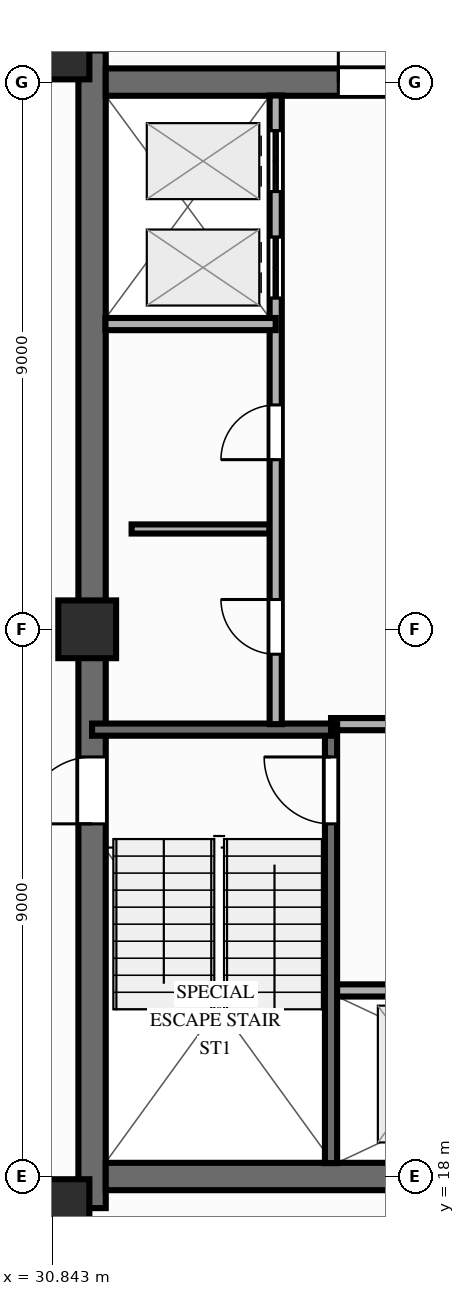
"""IFC4 building model, lengths in metres.
Left out: names, types, materials, properties, quantities, classifications, styles, units other than length and angle.
Written with IfcOpenShell. Run it as: python <this file> out.ifc"""

import sys

from ifc_helpers import new_model, si_unit, direction, frame, frame_2d, origin, origin_2d, place, context, subcontext, project, spatial, rectangle, extrude, source, transform, mapped, element, fill, save


model = new_model("IFC4")
c1 = context("Model", 3, precision=1e-05, world=origin(), true_north=direction((0.0, 1.0)))
c2 = subcontext(c1, "Body", "Model", "MODEL_VIEW")
j1 = project(units=[si_unit("LENGTHUNIT", "METRE"), si_unit("PLANEANGLEUNIT", "RADIAN")], contexts=[c1])
p1 = place(None, origin())
s1 = spatial("IfcSite", under=j1, at=p1, CompositionType="ELEMENT")
p2 = place(p1, origin())
s2 = spatial("IfcBuilding", under=s1, at=p2, CompositionType="ELEMENT")
p3 = place(p2, frame((0.0, 0.0, 236.1)))
s3 = spatial("IfcBuildingStorey", under=s2, at=p3, CompositionType="ELEMENT", Elevation=236.1)
p4 = place(p3, frame((31.5, 17.48, 0.0), z_axis=(0.0, 0.0, 1.0), x_axis=(0.0, 1.0, 0.0)))
e1 = element("IfcWall", 1, at=p4, inside=s3, PredefinedType="SHEAR", context=c2, shape_type="SweptSolid", body=[
    extrude(rectangle(XDim=19.04, YDim=0.45, at=frame_2d((9.52, 0.0))), origin(), (0.0, 0.0, 1.0), 3.9),
])
p5 = place(p4, frame((6.32, 0.0, 0.0)))
e2 = element("IfcOpeningElement", 2, at=p5, cuts=e1, PredefinedType="OPENING", context=c2, shape_type="SweptSolid", body=[
    extrude(rectangle(XDim=1.1, YDim=2.15, at=frame_2d((0.55, 1.075))), frame((0.0, 0.237, 0.0), z_axis=(0.0, -1.0, 0.0), x_axis=(1.0, 0.0, 0.0)), (0.0, 0.0, 1.0), 0.474),
])
p6 = place(p3, frame((31.725, 18.0, 0.0), z_axis=(0.0, 0.0, 1.0), x_axis=(1.0, 0.0, 0.0)))
e3 = element("IfcWall", 3, at=p6, inside=s3, PredefinedType="SHEAR", context=c2, shape_type="SweptSolid", body=[
    extrude(rectangle(XDim=12.55, YDim=0.45, at=frame_2d((6.275, 0.0))), origin(), (0.0, 0.0, 1.0), 3.9),
])
p7 = place(p3, frame((31.725, 36.0, 0.0), z_axis=(0.0, 0.0, 1.0), x_axis=(1.0, 0.0, 0.0)))
e4 = element("IfcWall", 4, at=p7, inside=s3, PredefinedType="SHEAR", context=c2, shape_type="SweptSolid", body=[
    extrude(rectangle(XDim=12.55, YDim=0.45, at=frame_2d((6.275, 0.0))), origin(), (0.0, 0.0, 1.0), 3.9),
])
p8 = place(p7, frame((5.225, 0.0, 0.0), z_axis=(0.0, 0.0, 1.0), x_axis=(-1.0, 0.0, 0.0)))
e5 = element("IfcOpeningElement", 5, at=p8, cuts=e4, PredefinedType="OPENING", context=c2, shape_type="SweptSolid", body=[
    extrude(rectangle(XDim=1.4, YDim=2.15, at=frame_2d((0.7, 1.075))), frame((0.0, 0.237, 0.0), z_axis=(0.0, -1.0, 0.0), x_axis=(1.0, 0.0, 0.0)), (0.0, 0.0, 1.0), 0.474),
])
m1 = source(origin(), c2, "Body", "SweptSolid", [
    extrude(rectangle(XDim=0.95, YDim=0.95, at=origin_2d()), origin(), (0.0, 0.0, 1.0), 3.9),
])
for number, where, z_axis, x_axis in (
    (6, (30.98, 17.48, 0.0), (0.0, 0.0, 1.0), (1.0, 0.0, 0.0)),
    (7, (30.98, 36.52, 0.0), (0.0, 0.0, 1.0), (1.0, 0.0, 0.0)),
    (8, (31.42, 27.0, 0.0), (0.0, 0.0, 1.0), (1.0, 0.0, 0.0)),
):
    element("IfcColumn", number, at=place(p3, frame(where, z_axis=z_axis, x_axis=x_axis)), inside=s3, PredefinedType="COLUMN", context=c2, shape_type="MappedRepresentation", body=[
        mapped(m1, transform((0.0, 0.0, 0.0), scale=1.0)),
    ])
p9 = place(p3, frame((32.15, 28.65, 0.0), z_axis=(0.0, 0.0, 1.0), x_axis=(1.0, 0.0, 0.0)))
e9 = element("IfcWall", 9, at=p9, inside=s3, PredefinedType="PARTITIONING", context=c2, shape_type="SweptSolid", body=[
    extrude(rectangle(XDim=2.27, YDim=0.15, at=frame_2d((1.135, 0.0))), origin(), (0.0, 0.0, 1.0), 3.04),
])
p10 = place(p3, frame((35.43, 21.06, 0.0), z_axis=(0.0, 0.0, 1.0), x_axis=(1.0, 0.0, 0.0)))
e10 = element("IfcWall", 10, at=p10, inside=s3, PredefinedType="PARTITIONING", context=c2, shape_type="SweptSolid", body=[
    extrude(rectangle(XDim=6.02, YDim=0.2, at=frame_2d((3.01, 0.0))), origin(), (0.0, 0.0, 1.0), 3.56),
])
p11 = place(p10, frame((1.0, 0.0, 0.0)))
e11 = element("IfcOpeningElement", 11, at=p11, cuts=e10, PredefinedType="OPENING", context=c2, shape_type="SweptSolid", body=[
    extrude(rectangle(XDim=1.1, YDim=2.15, at=frame_2d((0.55, 1.075))), frame((0.0, 0.112, 0.0), z_axis=(0.0, -1.0, 0.0), x_axis=(1.0, 0.0, 0.0)), (0.0, 0.0, 1.0), 0.224),
])
p12 = place(p10, frame((2.95, 0.0, 0.0)))
e12 = element("IfcOpeningElement", 12, at=p12, cuts=e10, PredefinedType="OPENING", context=c2, shape_type="SweptSolid", body=[
    extrude(rectangle(XDim=1.1, YDim=2.15, at=frame_2d((0.55, 1.075))), frame((0.0, 0.112, 0.0), z_axis=(0.0, -1.0, 0.0), x_axis=(1.0, 0.0, 0.0)), (0.0, 0.0, 1.0), 0.224),
])
p13 = place(p10, frame((4.58, 0.0, 0.0)))
e13 = element("IfcOpeningElement", 13, at=p13, cuts=e10, PredefinedType="OPENING", context=c2, shape_type="SweptSolid", body=[
    extrude(rectangle(XDim=1.2, YDim=2.15, at=frame_2d((0.6, 1.075))), frame((0.0, 0.112, 0.0), z_axis=(0.0, -1.0, 0.0), x_axis=(1.0, 0.0, 0.0)), (0.0, 0.0, 1.0), 0.224),
])
p14 = place(p3, frame((35.43, 25.44, 0.0), z_axis=(0.0, 0.0, 1.0), x_axis=(1.0, 0.0, 0.0)))
e14 = element("IfcWall", 14, at=p14, inside=s3, PredefinedType="PARTITIONING", context=c2, shape_type="SweptSolid", body=[
    extrude(rectangle(XDim=4.72, YDim=0.2, at=frame_2d((2.36, 0.0))), origin(), (0.0, 0.0, 1.0), 3.56),
])
p15 = place(p14, frame((1.25, 0.0, 0.0)))
e15 = element("IfcOpeningElement", 15, at=p15, cuts=e14, PredefinedType="OPENING", context=c2, shape_type="SweptSolid", body=[
    extrude(rectangle(XDim=1.1, YDim=2.15, at=frame_2d((0.55, 1.075))), frame((0.0, 0.112, 0.0), z_axis=(0.0, -1.0, 0.0), x_axis=(1.0, 0.0, 0.0)), (0.0, 0.0, 1.0), 0.224),
])
p16 = place(p3, frame((35.43, 18.22, 0.0), z_axis=(0.0, 0.0, 1.0), x_axis=(0.0, 1.0, 0.0)))
e16 = element("IfcWall", 16, at=p16, inside=s3, PredefinedType="SOLIDWALL", context=c2, shape_type="SweptSolid", body=[
    extrude(rectangle(XDim=7.22, YDim=0.2, at=frame_2d((3.61, 0.0))), origin(), (0.0, 0.0, 1.0), 3.69),
])
p17 = place(p16, frame((6.68, 0.0, 0.0), z_axis=(0.0, 0.0, 1.0), x_axis=(-1.0, 0.0, 0.0)))
e17 = element("IfcOpeningElement", 17, at=p17, cuts=e16, PredefinedType="OPENING", context=c2, shape_type="SweptSolid", body=[
    extrude(rectangle(XDim=1.1, YDim=2.15, at=frame_2d((0.55, 1.075))), frame((0.0, 0.112, 0.0), z_axis=(0.0, -1.0, 0.0), x_axis=(1.0, 0.0, 0.0)), (0.0, 0.0, 1.0), 0.224),
])
p18 = place(p3, frame((31.5, 25.35, 0.0), z_axis=(0.0, 0.0, 1.0), x_axis=(1.0, 0.0, 0.0)))
e18 = element("IfcWall", 18, at=p18, inside=s3, PredefinedType="SOLIDWALL", context=c2, shape_type="SweptSolid", body=[
    extrude(rectangle(XDim=3.93, YDim=0.2, at=frame_2d((1.965, 0.0))), origin(), (0.0, 0.0, 1.0), 3.69),
])
p19 = place(p3, frame((34.52, 25.44, 0.0), z_axis=(0.0, 0.0, 1.0), x_axis=(0.0, 1.0, 0.0)))
e19 = element("IfcWall", 19, at=p19, inside=s3, PredefinedType="PARTITIONING", context=c2, shape_type="SweptSolid", body=[
    extrude(rectangle(XDim=10.34, YDim=0.2, at=frame_2d((5.17, 0.0))), origin(), (0.0, 0.0, 1.0), 3.56),
])
p20 = place(p19, frame((1.15, 0.0, 0.0)))
e20 = element("IfcOpeningElement", 20, at=p20, cuts=e19, PredefinedType="OPENING", context=c2, shape_type="SweptSolid", body=[
    extrude(rectangle(XDim=0.9, YDim=2.1, at=frame_2d((0.45, 1.05))), frame((0.0, 0.112, 0.0), z_axis=(0.0, -1.0, 0.0), x_axis=(1.0, 0.0, 0.0)), (0.0, 0.0, 1.0), 0.224),
])
p21 = place(p19, frame((4.35, 0.0, 0.0)))
e21 = element("IfcOpeningElement", 21, at=p21, cuts=e19, PredefinedType="OPENING", context=c2, shape_type="SweptSolid", body=[
    extrude(rectangle(XDim=0.9, YDim=2.1, at=frame_2d((0.45, 1.05))), frame((0.0, 0.112, 0.0), z_axis=(0.0, -1.0, 0.0), x_axis=(1.0, 0.0, 0.0)), (0.0, 0.0, 1.0), 0.224),
])
p22 = place(p19, frame((7.01, 0.0, 0.0)))
e22 = element("IfcOpeningElement", 22, at=p22, cuts=e19, PredefinedType="OPENING", context=c2, shape_type="SweptSolid", body=[
    extrude(rectangle(XDim=1.0, YDim=2.15, at=frame_2d((0.5, 1.075))), frame((0.0, 0.112, 0.0), z_axis=(0.0, -1.0, 0.0), x_axis=(1.0, 0.0, 0.0)), (0.0, 0.0, 1.0), 0.224),
])
p23 = place(p19, frame((8.76, 0.0, 0.0)))
e23 = element("IfcOpeningElement", 23, at=p23, cuts=e19, PredefinedType="OPENING", context=c2, shape_type="SweptSolid", body=[
    extrude(rectangle(XDim=1.0, YDim=2.15, at=frame_2d((0.5, 1.075))), frame((0.0, 0.112, 0.0), z_axis=(0.0, -1.0, 0.0), x_axis=(1.0, 0.0, 0.0)), (0.0, 0.0, 1.0), 0.224),
])
p24 = place(p3, frame((31.72, 32.02, 0.0), z_axis=(0.0, 0.0, 1.0), x_axis=(1.0, 0.0, 0.0)))
e24 = element("IfcWall", 24, at=p24, inside=s3, PredefinedType="PARTITIONING", context=c2, shape_type="SweptSolid", body=[
    extrude(rectangle(XDim=2.8, YDim=0.2, at=frame_2d((1.4, 0.0))), origin(), (0.0, 0.0, 1.0), 3.56),
])
m2 = source(origin(), c2, "Body", "SweptSolid", [
    extrude(rectangle(XDim=1.1, YDim=2.15, at=frame_2d((0.55, 1.075))), frame((0.0, 0.025, 0.0), z_axis=(0.0, -1.0, 0.0), x_axis=(1.0, 0.0, 0.0)), (0.0, 0.0, 1.0), 0.05),
])
p25 = place(p5, origin())
e25 = element("IfcDoor", 25, at=p25, inside=s3, OperationType="SINGLE_SWING_LEFT", PredefinedType="DOOR", context=c2, shape_type="MappedRepresentation", body=[
    mapped(m2, transform((0.0, 0.0, 0.0), scale=1.0)),
])
fill(e2, e25)
m3 = source(origin(), c2, "Body", "SweptSolid", [
    extrude(rectangle(XDim=1.4, YDim=2.15, at=frame_2d((0.7, 1.075))), frame((0.0, 0.025, 0.0), z_axis=(0.0, -1.0, 0.0), x_axis=(1.0, 0.0, 0.0)), (0.0, 0.0, 1.0), 0.05),
])
p26 = place(p8, origin())
e26 = element("IfcDoor", 26, at=p26, inside=s3, OperationType="SINGLE_SWING_RIGHT", PredefinedType="DOOR", context=c2, shape_type="MappedRepresentation", body=[
    mapped(m3, transform((0.0, 0.0, 0.0), scale=1.0)),
])
fill(e5, e26)
p27 = place(p17, origin())
e27 = element("IfcDoor", 27, at=p27, inside=s3, OperationType="SINGLE_SWING_LEFT", PredefinedType="DOOR", context=c2, shape_type="MappedRepresentation", body=[
    mapped(m2, transform((0.0, 0.0, 0.0), scale=1.0)),
])
fill(e17, e27)
m4 = source(origin(), c2, "Body", "SweptSolid", [
    extrude(rectangle(XDim=0.9, YDim=2.1, at=frame_2d((0.45, 1.05))), frame((0.0, 0.025, 0.0), z_axis=(0.0, -1.0, 0.0), x_axis=(1.0, 0.0, 0.0)), (0.0, 0.0, 1.0), 0.05),
])
p28 = place(p20, origin())
e28 = element("IfcDoor", 28, at=p28, inside=s3, OperationType="SINGLE_SWING_RIGHT", PredefinedType="DOOR", context=c2, shape_type="MappedRepresentation", body=[
    mapped(m4, transform((0.0, 0.0, 0.0), scale=1.0)),
])
fill(e20, e28)
p29 = place(p21, origin())
e29 = element("IfcDoor", 29, at=p29, inside=s3, OperationType="SINGLE_SWING_LEFT", PredefinedType="DOOR", context=c2, shape_type="MappedRepresentation", body=[
    mapped(m4, transform((0.0, 0.0, 0.0), scale=1.0)),
])
fill(e21, e29)
m5 = source(origin(), c2, "Body", "SweptSolid", [
    extrude(rectangle(XDim=1.0, YDim=2.15, at=frame_2d((0.5, 1.075))), frame((0.0, 0.025, 0.0), z_axis=(0.0, -1.0, 0.0), x_axis=(1.0, 0.0, 0.0)), (0.0, 0.0, 1.0), 0.05),
])
p30 = place(p22, origin())
e30 = element("IfcDoor", 30, at=p30, inside=s3, OperationType="DOUBLE_DOOR_SLIDING", PredefinedType="DOOR", context=c2, shape_type="MappedRepresentation", body=[
    mapped(m5, transform((0.0, 0.0, 0.0), scale=1.0)),
])
fill(e22, e30)
p31 = place(p23, origin())
e31 = element("IfcDoor", 31, at=p31, inside=s3, OperationType="DOUBLE_DOOR_SLIDING", PredefinedType="DOOR", context=c2, shape_type="MappedRepresentation", body=[
    mapped(m5, transform((0.0, 0.0, 0.0), scale=1.0)),
])
fill(e23, e31)
save(model, sys.argv[1])
